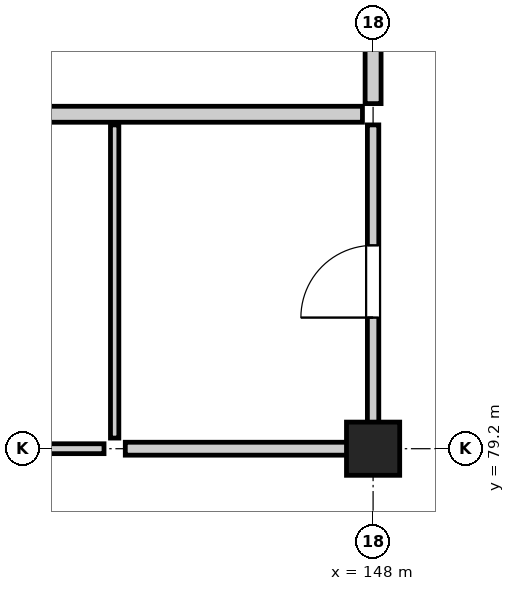
"""IFC4 building model, lengths in metres.
Left out: names, types, materials, properties, quantities, classifications, styles, units other than length and angle.
Written with IfcOpenShell. Run it as: python <this file> out.ifc"""

import sys

from ifc_helpers import new_model, si_unit, direction, frame, frame_2d, origin, origin_2d, place, context, subcontext, project, spatial, rectangle, extrude, element, fill, save


model = new_model("IFC4")
c1 = context("Model", 3, precision=1e-05, world=origin(), true_north=direction((0.0, 1.0)))
c2 = subcontext(c1, "Body", "Model", "MODEL_VIEW")
j1 = project(units=[si_unit("LENGTHUNIT", "METRE"), si_unit("PLANEANGLEUNIT", "RADIAN")], contexts=[c1])
p1 = place(None, origin())
s1 = spatial("IfcSite", under=j1, at=p1, CompositionType="ELEMENT")
p2 = place(p1, origin())
s2 = spatial("IfcBuilding", under=s1, at=p2, CompositionType="ELEMENT")
p3 = place(p2, frame((0.0, 0.0, 39.5)))
s3 = spatial("IfcBuildingStorey", under=s2, at=p3, CompositionType="ELEMENT", Elevation=39.5)
p4 = place(p3, frame((148.0, 79.2, 0.0), z_axis=(0.0, 0.0, 1.0), x_axis=(1.0, 0.0, 0.0)))
e1 = element("IfcColumn", 1, at=p4, inside=s3, PredefinedType="COLUMN", context=c2, shape_type="SweptSolid", body=[
    extrude(rectangle(XDim=0.7, YDim=0.7, at=origin_2d()), origin(), (0.0, 0.0, 1.0), 3.8),
])
p5 = place(p3, frame((140.14, 83.6, 0.0), z_axis=(0.0, 0.0, 1.0), x_axis=(1.0, 0.0, 0.0)))
e2 = element("IfcWall", 2, at=p5, inside=s3, PredefinedType="SOLIDWALL", context=c2, shape_type="SweptSolid", body=[
    extrude(rectangle(XDim=7.72, YDim=0.21, at=frame_2d((3.86, 0.0))), origin(), (0.0, 0.0, 1.0), 3.52),
])
p6 = place(p3, frame((148.0, 83.74, 0.0), z_axis=(0.0, 0.0, 1.0), x_axis=(0.0, 1.0, 0.0)))
e3 = element("IfcWall", 3, at=p6, inside=s3, PredefinedType="SOLIDWALL", context=c2, shape_type="SweptSolid", body=[
    extrude(rectangle(XDim=3.32, YDim=0.21, at=frame_2d((1.66, 0.0))), origin(), (0.0, 0.0, 1.0), 2.935),
])
p7 = place(p6, frame((1.16, 0.0, 0.0)))
e4 = element("IfcOpeningElement", 4, at=p7, cuts=e3, PredefinedType="OPENING", context=c2, shape_type="SweptSolid", body=[
    extrude(rectangle(XDim=1.0, YDim=2.15, at=frame_2d((0.5, 1.075))), frame((0.0, 0.117, 0.0), z_axis=(0.0, -1.0, 0.0), x_axis=(1.0, 0.0, 0.0)), (0.0, 0.0, 1.0), 0.234),
])
p8 = place(p3, frame((140.14, 79.2, 0.0), z_axis=(0.0, 0.0, 1.0), x_axis=(1.0, 0.0, 0.0)))
e5 = element("IfcWall", 5, at=p8, inside=s3, PredefinedType="PARTITIONING", context=c2, shape_type="SweptSolid", body=[
    extrude(rectangle(XDim=4.32, YDim=0.13, at=frame_2d((2.16, 0.0))), origin(), (0.0, 0.0, 1.0), 3.035),
])
p9 = place(p8, frame((1.66, 0.0, 0.0)))
e6 = element("IfcOpeningElement", 6, at=p9, cuts=e5, PredefinedType="OPENING", context=c2, shape_type="SweptSolid", body=[
    extrude(rectangle(XDim=1.0, YDim=2.15, at=frame_2d((0.5, 1.075))), frame((0.0, 0.077, 0.0), z_axis=(0.0, -1.0, 0.0), x_axis=(1.0, 0.0, 0.0)), (0.0, 0.0, 1.0), 0.154),
])
p10 = place(p3, frame((144.6, 79.34, 0.0), z_axis=(0.0, 0.0, 1.0), x_axis=(0.0, 1.0, 0.0)))
e7 = element("IfcWall", 7, at=p10, inside=s3, PredefinedType="PARTITIONING", context=c2, shape_type="SweptSolid", body=[
    extrude(rectangle(XDim=4.12, YDim=0.11, at=frame_2d((2.06, 0.0))), origin(), (0.0, 0.0, 1.0), 3.52),
])
p11 = place(p3, frame((144.74, 79.2, 0.0), z_axis=(0.0, 0.0, 1.0), x_axis=(1.0, 0.0, 0.0)))
e8 = element("IfcWall", 8, at=p11, inside=s3, PredefinedType="PARTITIONING", context=c2, shape_type="SweptSolid", body=[
    extrude(rectangle(XDim=3.12, YDim=0.17, at=frame_2d((1.56, 0.0))), origin(), (0.0, 0.0, 1.0), 3.035),
])
p12 = place(p3, frame((148.0, 79.34, 0.0), z_axis=(0.0, 0.0, 1.0), x_axis=(0.0, 1.0, 0.0)))
e9 = element("IfcWall", 9, at=p12, inside=s3, PredefinedType="PARTITIONING", context=c2, shape_type="SweptSolid", body=[
    extrude(rectangle(XDim=4.12, YDim=0.15, at=frame_2d((2.06, 0.0))), origin(), (0.0, 0.0, 1.0), 2.935),
])
p13 = place(p12, frame((1.585, 0.0, 0.0)))
e10 = element("IfcOpeningElement", 10, at=p13, cuts=e9, PredefinedType="OPENING", context=c2, shape_type="SweptSolid", body=[
    extrude(rectangle(XDim=0.95, YDim=2.15, at=frame_2d((0.475, 1.075))), frame((0.0, 0.087, 0.0), z_axis=(0.0, -1.0, 0.0), x_axis=(1.0, 0.0, 0.0)), (0.0, 0.0, 1.0), 0.174),
])
p14 = place(p13, origin())
e11 = element("IfcDoor", 11, at=p14, inside=s3, OperationType="SINGLE_SWING_LEFT", PredefinedType="DOOR", context=c2, shape_type="SweptSolid", body=[
    extrude(rectangle(XDim=0.95, YDim=2.15, at=frame_2d((0.475, 1.075))), frame((0.0, 0.025, 0.0), z_axis=(0.0, -1.0, 0.0), x_axis=(1.0, 0.0, 0.0)), (0.0, 0.0, 1.0), 0.05),
])
fill(e10, e11)
save(model, sys.argv[1])
